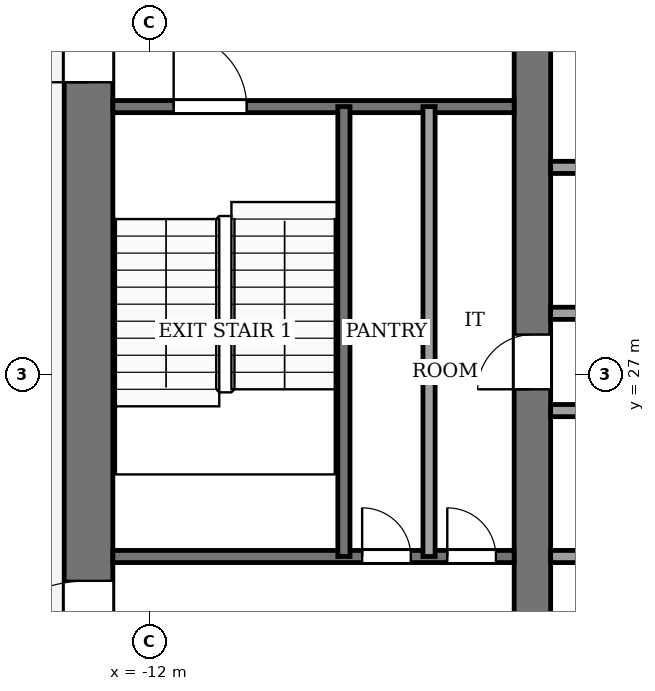
"""IFC4 building model, lengths in metres.
Left out: names, types, materials, properties, quantities, classifications, styles, units other than length and angle.
Written with IfcOpenShell. Run it as: python <this file> out.ifc"""

import sys

from ifc_helpers import new_model, si_unit, direction, frame, frame_2d, origin, place, context, subcontext, project, spatial, rectangle, extrude, element, fill, save


model = new_model("IFC4")
c1 = context("Model", 3, precision=1e-05, world=origin(), true_north=direction((0.0, 1.0)))
c2 = subcontext(c1, "Body", "Model", "MODEL_VIEW")
j1 = project(units=[si_unit("LENGTHUNIT", "METRE"), si_unit("PLANEANGLEUNIT", "RADIAN")], contexts=[c1])
p1 = place(None, origin())
s1 = spatial("IfcSite", under=j1, at=p1, CompositionType="ELEMENT")
p2 = place(p1, origin())
s2 = spatial("IfcBuilding", under=s1, at=p2, CompositionType="ELEMENT")
p3 = place(p2, frame((0.0, 0.0, 246.0)))
s3 = spatial("IfcBuildingStorey", under=s2, at=p3, CompositionType="ELEMENT", Elevation=246.0)
p4 = place(p3, frame((-13.0, 18.4, -0.13), z_axis=(0.0, 0.0, 1.0), x_axis=(0.0, 1.0, 0.0)))
e1 = element("IfcWall", 1, at=p4, inside=s3, PredefinedType="SHEAR", context=c2, shape_type="SweptSolid", body=[
    extrude(rectangle(XDim=19.2, YDim=0.8, at=frame_2d((9.6, 0.0))), origin(), (0.0, 0.0, 1.0), 4.0),
])
p5 = place(p4, frame((2.8, 0.0, 0.13)))
e2 = element("IfcOpeningElement", 2, at=p5, cuts=e1, PredefinedType="OPENING", context=c2, shape_type="SweptSolid", body=[
    extrude(rectangle(XDim=2.4, YDim=2.4, at=frame_2d((1.2, 1.2))), frame((0.0, 0.41, 0.0), z_axis=(0.0, -1.0, 0.0), x_axis=(1.0, 0.0, 0.0)), (0.0, 0.0, 1.0), 0.82),
])
p6 = place(p4, frame((13.4, 0.0, 0.13)))
e3 = element("IfcOpeningElement", 3, at=p6, cuts=e1, PredefinedType="OPENING", context=c2, shape_type="SweptSolid", body=[
    extrude(rectangle(XDim=1.4, YDim=2.2, at=frame_2d((0.7, 1.1))), frame((0.0, 0.41, 0.0), z_axis=(0.0, -1.0, 0.0), x_axis=(1.0, 0.0, 0.0)), (0.0, 0.0, 1.0), 0.82),
])
p7 = place(p3, frame((-5.7, 18.4, -0.13), z_axis=(0.0, 0.0, 1.0), x_axis=(0.0, 1.0, 0.0)))
e4 = element("IfcWall", 4, at=p7, inside=s3, PredefinedType="SHEAR", context=c2, shape_type="SweptSolid", body=[
    extrude(rectangle(XDim=19.2, YDim=0.6, at=frame_2d((9.6, 0.0))), origin(), (0.0, 0.0, 1.0), 4.0),
])
p8 = place(p7, frame((8.35, 0.0, 0.13)))
e5 = element("IfcOpeningElement", 5, at=p8, cuts=e4, PredefinedType="OPENING", context=c2, shape_type="SweptSolid", body=[
    extrude(rectangle(XDim=0.9, YDim=2.1, at=frame_2d((0.45, 1.05))), frame((0.0, 0.31, 0.0), z_axis=(0.0, -1.0, 0.0), x_axis=(1.0, 0.0, 0.0)), (0.0, 0.0, 1.0), 0.62),
])
p9 = place(p3, frame((-12.6, 24.0, 0.0), z_axis=(0.0, 0.0, 1.0), x_axis=(1.0, 0.0, 0.0)))
e6 = element("IfcWall", 6, at=p9, inside=s3, PredefinedType="PARTITIONING", context=c2, shape_type="SweptSolid", body=[
    extrude(rectangle(XDim=6.6, YDim=0.2, at=frame_2d((3.3, 0.0))), origin(), (0.0, 0.0, 1.0), 3.87),
])
p10 = place(p9, frame((4.1, 0.0, 0.0)))
e7 = element("IfcOpeningElement", 7, at=p10, cuts=e6, PredefinedType="OPENING", context=c2, shape_type="SweptSolid", body=[
    extrude(rectangle(XDim=0.8, YDim=2.1, at=frame_2d((0.4, 1.05))), frame((0.0, 0.11, 0.0), z_axis=(0.0, -1.0, 0.0), x_axis=(1.0, 0.0, 0.0)), (0.0, 0.0, 1.0), 0.22),
])
p11 = place(p9, frame((5.5, 0.0, 0.0)))
e8 = element("IfcOpeningElement", 8, at=p11, cuts=e6, PredefinedType="OPENING", context=c2, shape_type="SweptSolid", body=[
    extrude(rectangle(XDim=0.8, YDim=2.1, at=frame_2d((0.4, 1.05))), frame((0.0, 0.11, 0.0), z_axis=(0.0, -1.0, 0.0), x_axis=(1.0, 0.0, 0.0)), (0.0, 0.0, 1.0), 0.22),
])
p12 = place(p3, frame((-5.4, 24.0, 0.0), z_axis=(0.0, 0.0, 1.0), x_axis=(1.0, 0.0, 0.0)))
e9 = element("IfcWall", 9, at=p12, inside=s3, PredefinedType="PARTITIONING", context=c2, shape_type="SweptSolid", body=[
    extrude(rectangle(XDim=10.8, YDim=0.2, at=frame_2d((5.4, 0.0))), origin(), (0.0, 0.0, 1.0), 3.87),
])
p13 = place(p12, frame((0.75, 0.0, 0.0)))
e10 = element("IfcOpeningElement", 10, at=p13, cuts=e9, PredefinedType="OPENING", context=c2, shape_type="SweptSolid", body=[
    extrude(rectangle(XDim=1.2, YDim=2.2, at=frame_2d((0.6, 1.1))), frame((0.0, 0.11, 0.0), z_axis=(0.0, -1.0, 0.0), x_axis=(1.0, 0.0, 0.0)), (0.0, 0.0, 1.0), 0.22),
])
p14 = place(p12, frame((3.45, 0.0, 0.0)))
e11 = element("IfcOpeningElement", 11, at=p14, cuts=e9, PredefinedType="OPENING", context=c2, shape_type="SweptSolid", body=[
    extrude(rectangle(XDim=1.2, YDim=2.2, at=frame_2d((0.6, 1.1))), frame((0.0, 0.11, 0.0), z_axis=(0.0, -1.0, 0.0), x_axis=(1.0, 0.0, 0.0)), (0.0, 0.0, 1.0), 0.22),
])
p15 = place(p12, frame((6.15, 0.0, 0.0)))
e12 = element("IfcOpeningElement", 12, at=p15, cuts=e9, PredefinedType="OPENING", context=c2, shape_type="SweptSolid", body=[
    extrude(rectangle(XDim=1.2, YDim=2.2, at=frame_2d((0.6, 1.1))), frame((0.0, 0.11, 0.0), z_axis=(0.0, -1.0, 0.0), x_axis=(1.0, 0.0, 0.0)), (0.0, 0.0, 1.0), 0.22),
])
p16 = place(p12, frame((8.85, 0.0, 0.0)))
e13 = element("IfcOpeningElement", 13, at=p16, cuts=e9, PredefinedType="OPENING", context=c2, shape_type="SweptSolid", body=[
    extrude(rectangle(XDim=1.2, YDim=2.2, at=frame_2d((0.6, 1.1))), frame((0.0, 0.11, 0.0), z_axis=(0.0, -1.0, 0.0), x_axis=(1.0, 0.0, 0.0)), (0.0, 0.0, 1.0), 0.22),
])
for number, where, z_axis, x_axis in (
    (14, (-5.4, 26.4, 0.0), (0.0, 0.0, 1.0), (1.0, 0.0, 0.0)),
    (15, (-5.4, 28.0, 0.0), (0.0, 0.0, 1.0), (1.0, 0.0, 0.0)),
):
    element("IfcWall", number, at=place(p3, frame(where, z_axis=z_axis, x_axis=x_axis)), inside=s3, PredefinedType="PARTITIONING", context=c2, shape_type="SweptSolid", body=[
        extrude(rectangle(XDim=10.8, YDim=0.2, at=frame_2d((5.4, 0.0))), origin(), (0.0, 0.0, 1.0), 3.87),
    ])
p17 = place(p3, frame((-5.4, 30.4, 0.0), z_axis=(0.0, 0.0, 1.0), x_axis=(1.0, 0.0, 0.0)))
e16 = element("IfcWall", 16, at=p17, inside=s3, PredefinedType="PARTITIONING", context=c2, shape_type="SweptSolid", body=[
    extrude(rectangle(XDim=10.8, YDim=0.2, at=frame_2d((5.4, 0.0))), origin(), (0.0, 0.0, 1.0), 3.87),
])
p18 = place(p17, frame((2.47, 0.0, 0.0)))
e17 = element("IfcOpeningElement", 17, at=p18, cuts=e16, PredefinedType="OPENING", context=c2, shape_type="SweptSolid", body=[
    extrude(rectangle(XDim=1.0, YDim=2.1, at=frame_2d((0.5, 1.05))), frame((0.0, 0.11, 0.0), z_axis=(0.0, -1.0, 0.0), x_axis=(1.0, 0.0, 0.0)), (0.0, 0.0, 1.0), 0.22),
])
p19 = place(p17, frame((7.87, 0.0, 0.0)))
e18 = element("IfcOpeningElement", 18, at=p19, cuts=e16, PredefinedType="OPENING", context=c2, shape_type="SweptSolid", body=[
    extrude(rectangle(XDim=1.0, YDim=2.1, at=frame_2d((0.5, 1.05))), frame((0.0, 0.11, 0.0), z_axis=(0.0, -1.0, 0.0), x_axis=(1.0, 0.0, 0.0)), (0.0, 0.0, 1.0), 0.22),
])
p20 = place(p3, frame((-12.6, 31.4, 0.0), z_axis=(0.0, 0.0, 1.0), x_axis=(1.0, 0.0, 0.0)))
e19 = element("IfcWall", 19, at=p20, inside=s3, PredefinedType="PARTITIONING", context=c2, shape_type="SweptSolid", body=[
    extrude(rectangle(XDim=6.6, YDim=0.2, at=frame_2d((3.3, 0.0))), origin(), (0.0, 0.0, 1.0), 3.87),
])
p21 = place(p20, frame((1.0, 0.0, 0.0)))
e20 = element("IfcOpeningElement", 20, at=p21, cuts=e19, PredefinedType="OPENING", context=c2, shape_type="SweptSolid", body=[
    extrude(rectangle(XDim=1.2, YDim=2.2, at=frame_2d((0.6, 1.1))), frame((0.0, 0.11, 0.0), z_axis=(0.0, -1.0, 0.0), x_axis=(1.0, 0.0, 0.0)), (0.0, 0.0, 1.0), 0.22),
])
for number, where, z_axis, x_axis in (
    (21, (-8.8, 24.0, 0.0), (0.0, 0.0, 1.0), (0.0, 1.0, 0.0)),
    (22, (-7.4, 24.0, 0.0), (0.0, 0.0, 1.0), (0.0, 1.0, 0.0)),
):
    element("IfcWall", number, at=place(p3, frame(where, z_axis=z_axis, x_axis=x_axis)), inside=s3, PredefinedType="PARTITIONING", context=c2, shape_type="SweptSolid", body=[
        extrude(rectangle(XDim=7.4, YDim=0.2, at=frame_2d((3.7, 0.0))), origin(), (0.0, 0.0, 1.0), 3.87),
    ])
p22 = place(p10, origin())
e23 = element("IfcDoor", 23, at=p22, inside=s3, OperationType="SINGLE_SWING_LEFT", PredefinedType="DOOR", context=c2, shape_type="SweptSolid", body=[
    extrude(rectangle(XDim=0.8, YDim=2.1, at=frame_2d((0.4, 1.05))), frame((0.0, 0.025, 0.0), z_axis=(0.0, -1.0, 0.0), x_axis=(1.0, 0.0, 0.0)), (0.0, 0.0, 1.0), 0.05),
])
fill(e7, e23)
p23 = place(p11, origin())
e24 = element("IfcDoor", 24, at=p23, inside=s3, OperationType="SINGLE_SWING_RIGHT", PredefinedType="DOOR", context=c2, shape_type="SweptSolid", body=[
    extrude(rectangle(XDim=0.8, YDim=2.1, at=frame_2d((0.4, 1.05))), frame((0.0, 0.025, 0.0), z_axis=(0.0, -1.0, 0.0), x_axis=(1.0, 0.0, 0.0)), (0.0, 0.0, 1.0), 0.05),
])
fill(e8, e24)
p24 = place(p8, origin())
e25 = element("IfcDoor", 25, at=p24, inside=s3, OperationType="SINGLE_SWING_LEFT", PredefinedType="DOOR", context=c2, shape_type="SweptSolid", body=[
    extrude(rectangle(XDim=0.9, YDim=2.1, at=frame_2d((0.45, 1.05))), frame((0.0, 0.025, 0.0), z_axis=(0.0, -1.0, 0.0), x_axis=(1.0, 0.0, 0.0)), (0.0, 0.0, 1.0), 0.05),
])
fill(e5, e25)
p25 = place(p21, origin())
e26 = element("IfcDoor", 26, at=p25, inside=s3, OperationType="SINGLE_SWING_RIGHT", PredefinedType="DOOR", context=c2, shape_type="SweptSolid", body=[
    extrude(rectangle(XDim=1.2, YDim=2.2, at=frame_2d((0.6, 1.1))), frame((0.0, 0.025, 0.0), z_axis=(0.0, -1.0, 0.0), x_axis=(1.0, 0.0, 0.0)), (0.0, 0.0, 1.0), 0.05),
])
fill(e20, e26)
p26 = place(p5, origin())
e27 = element("IfcDoor", 27, at=p26, inside=s3, OperationType="DOUBLE_DOOR_SINGLE_SWING", PredefinedType="DOOR", context=c2, shape_type="SweptSolid", body=[
    extrude(rectangle(XDim=2.4, YDim=2.4, at=frame_2d((1.2, 1.2))), frame((0.0, 0.025, 0.0), z_axis=(0.0, -1.0, 0.0), x_axis=(1.0, 0.0, 0.0)), (0.0, 0.0, 1.0), 0.05),
])
fill(e2, e27)
p27 = place(p6, origin())
e28 = element("IfcDoor", 28, at=p27, inside=s3, OperationType="SINGLE_SWING_RIGHT", PredefinedType="DOOR", context=c2, shape_type="SweptSolid", body=[
    extrude(rectangle(XDim=1.4, YDim=2.2, at=frame_2d((0.7, 1.1))), frame((0.0, 0.025, 0.0), z_axis=(0.0, -1.0, 0.0), x_axis=(1.0, 0.0, 0.0)), (0.0, 0.0, 1.0), 0.05),
])
fill(e3, e28)
save(model, sys.argv[1])
